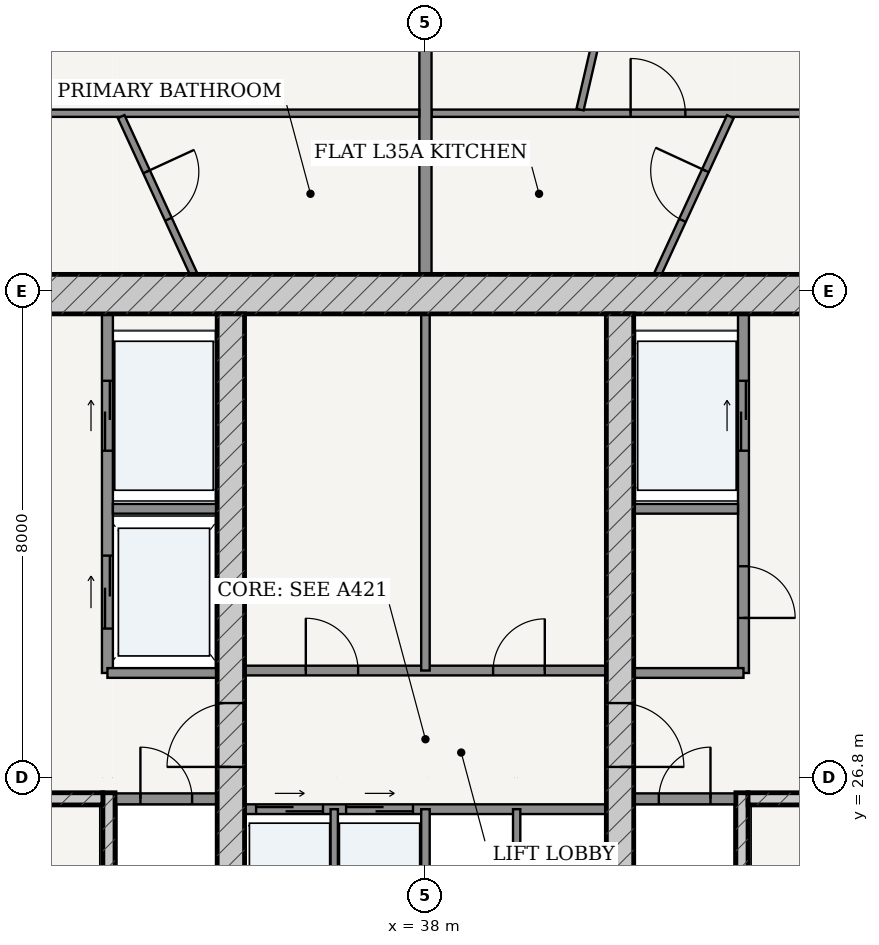
"""IFC4 building model, lengths in metres.
Left out: names, types, materials, properties, quantities, classifications, styles, units other than length and angle.
Written with IfcOpenShell. Run it as: python <this file> out.ifc"""

import sys

from ifc_helpers import new_model, si_unit, direction, frame, frame_2d, origin, place, context, subcontext, project, spatial, rectangle, extrude, source, transform, mapped, element, fill, save


model = new_model("IFC4")
c1 = context("Model", 3, precision=1e-05, world=origin(), true_north=direction((-0.2419218956, 0.970295726276)))
c2 = subcontext(c1, "Body", "Model", "MODEL_VIEW")
j1 = project(units=[si_unit("LENGTHUNIT", "METRE"), si_unit("PLANEANGLEUNIT", "RADIAN")], contexts=[c1])
p1 = place(None, origin())
s1 = spatial("IfcSite", under=j1, at=p1, CompositionType="ELEMENT")
p2 = place(p1, origin())
s2 = spatial("IfcBuilding", under=s1, at=p2, CompositionType="ELEMENT")
p3 = place(p2, frame((0.0, 0.0, 135.4)))
s3 = spatial("IfcBuildingStorey", under=s2, at=p3, CompositionType="ELEMENT", Elevation=135.4)
p4 = place(p3, frame((28.725, 34.75, 0.0), z_axis=(0.0, 0.0, 1.0), x_axis=(1.0, 0.0, 0.0)))
e1 = element("IfcWall", 1, at=p4, inside=s3, PredefinedType="SHEAR", context=c2, shape_type="SweptSolid", body=[
    extrude(rectangle(XDim=18.55, YDim=0.65, at=frame_2d((9.275, 0.0))), origin(), (0.0, 0.0, 1.0), 3.33),
])
p5 = place(p3, frame((32.795, 19.175, 0.0), z_axis=(0.0, 0.0, 1.0), x_axis=(0.0, 1.0, 0.0)))
e2 = element("IfcWall", 2, at=p5, inside=s3, PredefinedType="SOLIDWALL", context=c2, shape_type="SweptSolid", body=[
    extrude(rectangle(XDim=7.375, YDim=0.2, at=frame_2d((3.688, 0.0))), origin(), (0.0, 0.0, 1.0), 3.33),
])
p6 = place(p3, frame((29.375, 26.45, 0.0), z_axis=(0.0, 0.0, 1.0), x_axis=(1.0, 0.0, 0.0)))
e3 = element("IfcWall", 3, at=p6, inside=s3, PredefinedType="SOLIDWALL", context=c2, shape_type="SweptSolid", body=[
    extrude(rectangle(XDim=3.32, YDim=0.2, at=frame_2d((1.66, 0.0))), origin(), (0.0, 0.0, 1.0), 3.33),
])
p7 = place(p6, frame((1.185, 0.0, 0.0)))
e4 = element("IfcOpeningElement", 4, at=p7, cuts=e3, PredefinedType="OPENING", context=c2, shape_type="SweptSolid", body=[
    extrude(rectangle(XDim=0.95, YDim=2.15, at=frame_2d((0.475, 1.075))), frame((0.0, 0.11, 0.0), z_axis=(0.0, -1.0, 0.0), x_axis=(1.0, 0.0, 0.0)), (0.0, 0.0, 1.0), 0.22),
])
p8 = place(p3, frame((43.205, 19.175, 0.0), z_axis=(0.0, 0.0, 1.0), x_axis=(0.0, 1.0, 0.0)))
e5 = element("IfcWall", 5, at=p8, inside=s3, PredefinedType="SOLIDWALL", context=c2, shape_type="SweptSolid", body=[
    extrude(rectangle(XDim=7.375, YDim=0.2, at=frame_2d((3.688, 0.0))), origin(), (0.0, 0.0, 1.0), 3.33),
])
p9 = place(p3, frame((43.305, 26.45, 0.0), z_axis=(0.0, 0.0, 1.0), x_axis=(1.0, 0.0, 0.0)))
e6 = element("IfcWall", 6, at=p9, inside=s3, PredefinedType="SOLIDWALL", context=c2, shape_type="SweptSolid", body=[
    extrude(rectangle(XDim=3.32, YDim=0.2, at=frame_2d((1.66, 0.0))), origin(), (0.0, 0.0, 1.0), 3.33),
])
p10 = place(p9, frame((1.185, 0.0, 0.0)))
e7 = element("IfcOpeningElement", 7, at=p10, cuts=e6, PredefinedType="OPENING", context=c2, shape_type="SweptSolid", body=[
    extrude(rectangle(XDim=0.95, YDim=2.15, at=frame_2d((0.475, 1.075))), frame((0.0, 0.11, 0.0), z_axis=(0.0, -1.0, 0.0), x_axis=(1.0, 0.0, 0.0)), (0.0, 0.0, 1.0), 0.22),
])
p11 = place(p3, frame((34.8, 19.175, 0.0), z_axis=(0.0, 0.0, 1.0), x_axis=(0.0, 1.0, 0.0)))
e8 = element("IfcWall", 8, at=p11, inside=s3, PredefinedType="SHEAR", context=c2, shape_type="SweptSolid", body=[
    extrude(rectangle(XDim=15.25, YDim=0.45, at=frame_2d((7.625, 0.0))), origin(), (0.0, 0.0, 1.0), 3.33),
])
p12 = place(p11, frame((7.8, 0.0, 0.0)))
e9 = element("IfcOpeningElement", 9, at=p12, cuts=e8, PredefinedType="OPENING", context=c2, shape_type="SweptSolid", body=[
    extrude(rectangle(XDim=1.05, YDim=2.15, at=frame_2d((0.525, 1.075))), frame((0.0, 0.235, 0.0), z_axis=(0.0, -1.0, 0.0), x_axis=(1.0, 0.0, 0.0)), (0.0, 0.0, 1.0), 0.47),
])
p13 = place(p3, frame((41.2, 19.175, 0.0), z_axis=(0.0, 0.0, 1.0), x_axis=(0.0, 1.0, 0.0)))
e10 = element("IfcWall", 10, at=p13, inside=s3, PredefinedType="SHEAR", context=c2, shape_type="SweptSolid", body=[
    extrude(rectangle(XDim=15.25, YDim=0.45, at=frame_2d((7.625, 0.0))), origin(), (0.0, 0.0, 1.0), 3.33),
])
p14 = place(p13, frame((7.8, 0.0, 0.0)))
e11 = element("IfcOpeningElement", 11, at=p14, cuts=e10, PredefinedType="OPENING", context=c2, shape_type="SweptSolid", body=[
    extrude(rectangle(XDim=1.05, YDim=2.15, at=frame_2d((0.525, 1.075))), frame((0.0, 0.235, 0.0), z_axis=(0.0, -1.0, 0.0), x_axis=(1.0, 0.0, 0.0)), (0.0, 0.0, 1.0), 0.47),
])
p15 = place(p3, frame((32.9, 26.45, 0.0), z_axis=(0.0, 0.0, 1.0), x_axis=(1.0, 0.0, 0.0)))
e12 = element("IfcWall", 12, at=p15, inside=s3, PredefinedType="PARTITIONING", context=c2, shape_type="SweptSolid", body=[
    extrude(rectangle(XDim=1.675, YDim=0.18, at=frame_2d((0.837, 0.0))), origin(), (0.0, 0.0, 1.0), 3.33),
])
p16 = place(p15, frame((0.413, 0.0, 0.0)))
e13 = element("IfcOpeningElement", 13, at=p16, cuts=e12, PredefinedType="OPENING", context=c2, shape_type="SweptSolid", body=[
    extrude(rectangle(XDim=0.85, YDim=2.1, at=frame_2d((0.425, 1.05))), frame((0.0, 0.1, 0.0), z_axis=(0.0, -1.0, 0.0), x_axis=(1.0, 0.0, 0.0)), (0.0, 0.0, 1.0), 0.2),
])
p17 = place(p3, frame((41.425, 26.45, 0.0), z_axis=(0.0, 0.0, 1.0), x_axis=(1.0, 0.0, 0.0)))
e14 = element("IfcWall", 14, at=p17, inside=s3, PredefinedType="PARTITIONING", context=c2, shape_type="SweptSolid", body=[
    extrude(rectangle(XDim=1.675, YDim=0.18, at=frame_2d((0.837, 0.0))), origin(), (0.0, 0.0, 1.0), 3.33),
])
p18 = place(p17, frame((0.413, 0.0, 0.0)))
e15 = element("IfcOpeningElement", 15, at=p18, cuts=e14, PredefinedType="OPENING", context=c2, shape_type="SweptSolid", body=[
    extrude(rectangle(XDim=0.85, YDim=2.1, at=frame_2d((0.425, 1.05))), frame((0.0, 0.1, 0.0), z_axis=(0.0, -1.0, 0.0), x_axis=(1.0, 0.0, 0.0)), (0.0, 0.0, 1.0), 0.2),
])
p19 = place(p3, frame((32.77, 28.52, 0.0), z_axis=(0.0, 0.0, 1.0), x_axis=(0.0, 1.0, 0.0)))
e16 = element("IfcWall", 16, at=p19, inside=s3, PredefinedType="PARTITIONING", context=c2, shape_type="SweptSolid", body=[
    extrude(rectangle(XDim=5.905, YDim=0.18, at=frame_2d((2.953, 0.0))), origin(), (0.0, 0.0, 1.0), 3.33),
])
p20 = place(p19, frame((3.655, 0.0, 0.0)))
e17 = element("IfcOpeningElement", 17, at=p20, cuts=e16, PredefinedType="OPENING", context=c2, shape_type="SweptSolid", body=[
    extrude(rectangle(XDim=1.15, YDim=2.2, at=frame_2d((0.575, 1.1))), frame((0.0, 0.1, 0.0), z_axis=(0.0, -1.0, 0.0), x_axis=(1.0, 0.0, 0.0)), (0.0, 0.0, 1.0), 0.2),
])
p21 = place(p19, frame((0.73, 0.0, 0.0)))
e18 = element("IfcOpeningElement", 18, at=p21, cuts=e16, PredefinedType="OPENING", context=c2, shape_type="SweptSolid", body=[
    extrude(rectangle(XDim=1.2, YDim=2.25, at=frame_2d((0.6, 1.125))), frame((0.0, 0.1, 0.0), z_axis=(0.0, -1.0, 0.0), x_axis=(1.0, 0.0, 0.0)), (0.0, 0.0, 1.0), 0.2),
])
p22 = place(p3, frame((32.86, 31.22, 0.0), z_axis=(0.0, 0.0, 1.0), x_axis=(1.0, 0.0, 0.0)))
e19 = element("IfcWall", 19, at=p22, inside=s3, PredefinedType="PARTITIONING", context=c2, shape_type="SweptSolid", body=[
    extrude(rectangle(XDim=1.715, YDim=0.16, at=frame_2d((0.857, 0.0))), origin(), (0.0, 0.0, 1.0), 3.33),
])
p23 = place(p3, frame((32.77, 28.52, 0.0), z_axis=(0.0, 0.0, 1.0), x_axis=(1.0, 0.0, 0.0)))
e20 = element("IfcWall", 20, at=p23, inside=s3, PredefinedType="PARTITIONING", context=c2, shape_type="SweptSolid", body=[
    extrude(rectangle(XDim=1.805, YDim=0.16, at=frame_2d((0.902, 0.0))), origin(), (0.0, 0.0, 1.0), 3.33),
])
p24 = place(p3, frame((43.23, 28.52, 0.0), z_axis=(0.0, 0.0, 1.0), x_axis=(0.0, 1.0, 0.0)))
e21 = element("IfcWall", 21, at=p24, inside=s3, PredefinedType="PARTITIONING", context=c2, shape_type="SweptSolid", body=[
    extrude(rectangle(XDim=5.905, YDim=0.18, at=frame_2d((2.953, 0.0))), origin(), (0.0, 0.0, 1.0), 3.33),
])
p25 = place(p24, frame((0.905, 0.0, 0.0)))
e22 = element("IfcOpeningElement", 22, at=p25, cuts=e21, PredefinedType="OPENING", context=c2, shape_type="SweptSolid", body=[
    extrude(rectangle(XDim=0.85, YDim=2.1, at=frame_2d((0.425, 1.05))), frame((0.0, 0.1, 0.0), z_axis=(0.0, -1.0, 0.0), x_axis=(1.0, 0.0, 0.0)), (0.0, 0.0, 1.0), 0.2),
])
p26 = place(p24, frame((3.655, 0.0, 0.0)))
e23 = element("IfcOpeningElement", 23, at=p26, cuts=e21, PredefinedType="OPENING", context=c2, shape_type="SweptSolid", body=[
    extrude(rectangle(XDim=1.15, YDim=2.2, at=frame_2d((0.575, 1.1))), frame((0.0, 0.1, 0.0), z_axis=(0.0, -1.0, 0.0), x_axis=(1.0, 0.0, 0.0)), (0.0, 0.0, 1.0), 0.2),
])
p27 = place(p3, frame((41.425, 31.22, 0.0), z_axis=(0.0, 0.0, 1.0), x_axis=(1.0, 0.0, 0.0)))
e24 = element("IfcWall", 24, at=p27, inside=s3, PredefinedType="PARTITIONING", context=c2, shape_type="SweptSolid", body=[
    extrude(rectangle(XDim=1.715, YDim=0.16, at=frame_2d((0.857, 0.0))), origin(), (0.0, 0.0, 1.0), 3.33),
])
p28 = place(p3, frame((41.425, 28.52, 0.0), z_axis=(0.0, 0.0, 1.0), x_axis=(1.0, 0.0, 0.0)))
e25 = element("IfcWall", 25, at=p28, inside=s3, PredefinedType="PARTITIONING", context=c2, shape_type="SweptSolid", body=[
    extrude(rectangle(XDim=1.805, YDim=0.16, at=frame_2d((0.902, 0.0))), origin(), (0.0, 0.0, 1.0), 3.33),
])
p29 = place(p3, frame((35.025, 28.56, 0.0), z_axis=(0.0, 0.0, 1.0), x_axis=(1.0, 0.0, 0.0)))
e26 = element("IfcWall", 26, at=p29, inside=s3, PredefinedType="PARTITIONING", context=c2, shape_type="SweptSolid", body=[
    extrude(rectangle(XDim=5.95, YDim=0.16, at=frame_2d((2.975, 0.0))), origin(), (0.0, 0.0, 1.0), 3.33),
])
p30 = place(p29, frame((1.008, 0.0, 0.0)))
e27 = element("IfcOpeningElement", 27, at=p30, cuts=e26, PredefinedType="OPENING", context=c2, shape_type="SweptSolid", body=[
    extrude(rectangle(XDim=0.86, YDim=2.1, at=frame_2d((0.43, 1.05))), frame((0.0, 0.09, 0.0), z_axis=(0.0, -1.0, 0.0), x_axis=(1.0, 0.0, 0.0)), (0.0, 0.0, 1.0), 0.18),
])
p31 = place(p29, frame((4.087, 0.0, 0.0)))
e28 = element("IfcOpeningElement", 28, at=p31, cuts=e26, PredefinedType="OPENING", context=c2, shape_type="SweptSolid", body=[
    extrude(rectangle(XDim=0.85, YDim=2.1, at=frame_2d((0.425, 1.05))), frame((0.0, 0.09, 0.0), z_axis=(0.0, -1.0, 0.0), x_axis=(1.0, 0.0, 0.0)), (0.0, 0.0, 1.0), 0.18),
])
p32 = place(p3, frame((38.0, 28.56, 0.0), z_axis=(0.0, 0.0, 1.0), x_axis=(0.0, 1.0, 0.0)))
e29 = element("IfcWall", 29, at=p32, inside=s3, PredefinedType="PARTITIONING", context=c2, shape_type="SweptSolid", body=[
    extrude(rectangle(XDim=5.865, YDim=0.14, at=frame_2d((2.933, 0.0))), origin(), (0.0, 0.0, 1.0), 3.33),
])
p33 = place(p3, frame((35.025, 26.28, 0.0), z_axis=(0.0, 0.0, 1.0), x_axis=(1.0, 0.0, 0.0)))
e30 = element("IfcWall", 30, at=p33, inside=s3, PredefinedType="PARTITIONING", context=c2, shape_type="SweptSolid", body=[
    extrude(rectangle(XDim=5.95, YDim=0.16, at=frame_2d((2.975, 0.0))), origin(), (0.0, 0.0, 1.0), 3.33),
])
p34 = place(p33, frame((0.19, 0.0, 0.0)))
e31 = element("IfcOpeningElement", 31, at=p34, cuts=e30, PredefinedType="OPENING", context=c2, shape_type="SweptSolid", body=[
    extrude(rectangle(XDim=1.1, YDim=2.2, at=frame_2d((0.55, 1.1))), frame((0.0, 0.09, 0.0), z_axis=(0.0, -1.0, 0.0), x_axis=(1.0, 0.0, 0.0)), (0.0, 0.0, 1.0), 0.18),
])
p35 = place(p33, frame((1.67, 0.0, 0.0)))
e32 = element("IfcOpeningElement", 32, at=p35, cuts=e30, PredefinedType="OPENING", context=c2, shape_type="SweptSolid", body=[
    extrude(rectangle(XDim=1.1, YDim=2.2, at=frame_2d((0.55, 1.1))), frame((0.0, 0.09, 0.0), z_axis=(0.0, -1.0, 0.0), x_axis=(1.0, 0.0, 0.0)), (0.0, 0.0, 1.0), 0.18),
])
p36 = place(p3, frame((36.5, 23.72, 0.0), z_axis=(0.0, 0.0, 1.0), x_axis=(0.0, 1.0, 0.0)))
e33 = element("IfcWall", 33, at=p36, inside=s3, PredefinedType="PARTITIONING", context=c2, shape_type="SweptSolid", body=[
    extrude(rectangle(XDim=2.56, YDim=0.12, at=frame_2d((1.28, 0.0))), origin(), (0.0, 0.0, 1.0), 3.33),
])
p37 = place(p3, frame((38.0, 23.72, 0.0), z_axis=(0.0, 0.0, 1.0), x_axis=(0.0, 1.0, 0.0)))
e34 = element("IfcWall", 34, at=p37, inside=s3, PredefinedType="PARTITIONING", context=c2, shape_type="SweptSolid", body=[
    extrude(rectangle(XDim=2.56, YDim=0.14, at=frame_2d((1.28, 0.0))), origin(), (0.0, 0.0, 1.0), 3.33),
])
p38 = place(p3, frame((39.5, 23.72, 0.0), z_axis=(0.0, 0.0, 1.0), x_axis=(0.0, 1.0, 0.0)))
e35 = element("IfcWall", 35, at=p38, inside=s3, PredefinedType="PARTITIONING", context=c2, shape_type="SweptSolid", body=[
    extrude(rectangle(XDim=2.56, YDim=0.12, at=frame_2d((1.28, 0.0))), origin(), (0.0, 0.0, 1.0), 3.33),
])
p39 = place(p3, frame((38.102, 37.725, 0.0), z_axis=(0.0, 0.0, 1.0), x_axis=(1.0, 0.0, 0.0)))
e36 = element("IfcWall", 36, at=p39, inside=s3, PredefinedType="PARTITIONING", context=c2, shape_type="SweptSolid", body=[
    extrude(rectangle(XDim=6.363, YDim=0.12, at=frame_2d((3.182, 0.0))), origin(), (0.0, 0.0, 1.0), 2.776),
])
p40 = place(p39, frame((3.272, 0.0, 0.0)))
e37 = element("IfcOpeningElement", 37, at=p40, cuts=e36, PredefinedType="OPENING", context=c2, shape_type="SweptSolid", body=[
    extrude(rectangle(XDim=0.9, YDim=2.15, at=frame_2d((0.45, 1.075))), frame((0.0, 0.07, 0.0), z_axis=(0.0, -1.0, 0.0), x_axis=(1.0, 0.0, 0.0)), (0.0, 0.0, 1.0), 0.14),
])
p41 = place(p3, frame((40.542, 37.785, 0.0), z_axis=(0.0, 0.0, 1.0), x_axis=(0.225467545633, 0.974250679171, 0.0)))
e38 = element("IfcWall", 38, at=p41, inside=s3, PredefinedType="PARTITIONING", context=c2, shape_type="SweptSolid", body=[
    extrude(rectangle(XDim=9.559, YDim=0.12, at=frame_2d((4.78, 0.0))), origin(), (0.0, 0.0, 1.0), 2.776),
])
p42 = place(p41, frame((3.32, 0.0, 0.0)))
e39 = element("IfcOpeningElement", 39, at=p42, cuts=e38, PredefinedType="OPENING", context=c2, shape_type="SweptSolid", body=[
    extrude(rectangle(XDim=0.9, YDim=2.15, at=frame_2d((0.45, 1.075))), frame((0.0, 0.07, 0.0), z_axis=(0.0, -1.0, 0.0), x_axis=(1.0, 0.0, 0.0)), (0.0, 0.0, 1.0), 0.14),
])
p43 = place(p3, frame((41.817, 35.075, 0.0), z_axis=(0.0, 0.0, 1.0), x_axis=(0.418890148101, 0.908036917655, 0.0)))
e40 = element("IfcWall", 40, at=p43, inside=s3, PredefinedType="PARTITIONING", context=c2, shape_type="SweptSolid", body=[
    extrude(rectangle(XDim=2.856, YDim=0.12, at=frame_2d((1.428, 0.0))), origin(), (0.0, 0.0, 1.0), 3.33),
])
p44 = place(p43, frame((0.978, 0.0, 0.0)))
e41 = element("IfcOpeningElement", 41, at=p44, cuts=e40, PredefinedType="OPENING", context=c2, shape_type="SweptSolid", body=[
    extrude(rectangle(XDim=0.9, YDim=2.15, at=frame_2d((0.45, 1.075))), frame((0.0, 0.07, 0.0), z_axis=(0.0, -1.0, 0.0), x_axis=(1.0, 0.0, 0.0)), (0.0, 0.0, 1.0), 0.14),
])
p45 = place(p3, frame((38.0, 35.075, 0.0), z_axis=(0.0, 0.0, 1.0), x_axis=(0.0, 1.0, 0.0)))
e42 = element("IfcWall", 42, at=p45, inside=s3, PredefinedType="PARTITIONING", context=c2, shape_type="SweptSolid", body=[
    extrude(rectangle(XDim=12.465, YDim=0.2, at=frame_2d((6.232, 0.0))), origin(), (0.0, 0.0, 1.0), 2.415),
])
p46 = place(p3, frame((31.535, 37.725, 0.0), z_axis=(0.0, 0.0, 1.0), x_axis=(1.0, 0.0, 0.0)))
e43 = element("IfcWall", 43, at=p46, inside=s3, PredefinedType="PARTITIONING", context=c2, shape_type="SweptSolid", body=[
    extrude(rectangle(XDim=6.363, YDim=0.12, at=frame_2d((3.182, 0.0))), origin(), (0.0, 0.0, 1.0), 2.776),
])
p47 = place(p3, frame((34.19, 35.075, 0.0), z_axis=(0.0, 0.0, 1.0), x_axis=(-0.418255585009, 0.908329381672, 0.0)))
e44 = element("IfcWall", 44, at=p47, inside=s3, PredefinedType="PARTITIONING", context=c2, shape_type="SweptSolid", body=[
    extrude(rectangle(XDim=2.855, YDim=0.12, at=frame_2d((1.428, 0.0))), origin(), (0.0, 0.0, 1.0), 3.33),
])
p48 = place(p47, frame((0.998, 0.0, 0.0)))
e45 = element("IfcOpeningElement", 45, at=p48, cuts=e44, PredefinedType="OPENING", context=c2, shape_type="SweptSolid", body=[
    extrude(rectangle(XDim=0.86, YDim=2.15, at=frame_2d((0.43, 1.075))), frame((0.0, 0.07, 0.0), z_axis=(0.0, -1.0, 0.0), x_axis=(1.0, 0.0, 0.0)), (0.0, 0.0, 1.0), 0.14),
])
m1 = source(origin(), c2, "Body", "SweptSolid", [
    extrude(rectangle(XDim=1.05, YDim=2.15, at=frame_2d((0.525, 1.075))), frame((0.0, 0.025, 0.0), z_axis=(0.0, -1.0, 0.0), x_axis=(1.0, 0.0, 0.0)), (0.0, 0.0, 1.0), 0.05),
])
p49 = place(p12, origin())
e46 = element("IfcDoor", 46, at=p49, inside=s3, OperationType="SINGLE_SWING_LEFT", PredefinedType="DOOR", context=c2, shape_type="MappedRepresentation", body=[
    mapped(m1, transform((0.0, 0.0, 0.0), scale=1.0)),
])
fill(e9, e46)
p50 = place(p14, frame((1.05, 0.0, 0.0), z_axis=(0.0, 0.0, 1.0), x_axis=(-1.0, 0.0, 0.0)))
e47 = element("IfcDoor", 47, at=p50, inside=s3, OperationType="SINGLE_SWING_RIGHT", PredefinedType="DOOR", context=c2, shape_type="MappedRepresentation", body=[
    mapped(m1, transform((0.0, 0.0, 0.0), scale=1.0)),
])
fill(e11, e47)
m2 = source(origin(), c2, "Body", "SweptSolid", [
    extrude(rectangle(XDim=0.85, YDim=2.1, at=frame_2d((0.425, 1.05))), frame((0.0, 0.025, 0.0), z_axis=(0.0, -1.0, 0.0), x_axis=(1.0, 0.0, 0.0)), (0.0, 0.0, 1.0), 0.05),
])
p51 = place(p16, origin())
e48 = element("IfcDoor", 48, at=p51, inside=s3, OperationType="SINGLE_SWING_LEFT", PredefinedType="DOOR", context=c2, shape_type="MappedRepresentation", body=[
    mapped(m2, transform((0.0, 0.0, 0.0), scale=1.0)),
])
fill(e13, e48)
p52 = place(p18, origin())
e49 = element("IfcDoor", 49, at=p52, inside=s3, OperationType="SINGLE_SWING_RIGHT", PredefinedType="DOOR", context=c2, shape_type="MappedRepresentation", body=[
    mapped(m2, transform((0.0, 0.0, 0.0), scale=1.0)),
])
fill(e15, e49)
p53 = place(p25, frame((0.85, 0.0, 0.0), z_axis=(0.0, 0.0, 1.0), x_axis=(-1.0, 0.0, 0.0)))
e50 = element("IfcDoor", 50, at=p53, inside=s3, OperationType="SINGLE_SWING_RIGHT", PredefinedType="DOOR", context=c2, shape_type="MappedRepresentation", body=[
    mapped(m2, transform((0.0, 0.0, 0.0), scale=1.0)),
])
fill(e22, e50)
m3 = source(origin(), c2, "Body", "SweptSolid", [
    extrude(rectangle(XDim=0.86, YDim=2.1, at=frame_2d((0.43, 1.05))), frame((0.0, 0.025, 0.0), z_axis=(0.0, -1.0, 0.0), x_axis=(1.0, 0.0, 0.0)), (0.0, 0.0, 1.0), 0.05),
])
p54 = place(p30, origin())
e51 = element("IfcDoor", 51, at=p54, inside=s3, OperationType="SINGLE_SWING_LEFT", PredefinedType="DOOR", context=c2, shape_type="MappedRepresentation", body=[
    mapped(m3, transform((0.0, 0.0, 0.0), scale=1.0)),
])
fill(e27, e51)
p55 = place(p31, origin())
e52 = element("IfcDoor", 52, at=p55, inside=s3, OperationType="SINGLE_SWING_RIGHT", PredefinedType="DOOR", context=c2, shape_type="MappedRepresentation", body=[
    mapped(m2, transform((0.0, 0.0, 0.0), scale=1.0)),
])
fill(e28, e52)
m4 = source(origin(), c2, "Body", "SweptSolid", [
    extrude(rectangle(XDim=1.15, YDim=2.2, at=frame_2d((0.575, 1.1))), frame((0.0, 0.025, 0.0), z_axis=(0.0, -1.0, 0.0), x_axis=(1.0, 0.0, 0.0)), (0.0, 0.0, 1.0), 0.05),
])
p56 = place(p20, origin())
e53 = element("IfcDoor", 53, at=p56, inside=s3, OperationType="DOUBLE_DOOR_SLIDING", PredefinedType="DOOR", context=c2, shape_type="MappedRepresentation", body=[
    mapped(m4, transform((0.0, 0.0, 0.0), scale=1.0)),
])
fill(e17, e53)
p57 = place(p26, origin())
e54 = element("IfcDoor", 54, at=p57, inside=s3, OperationType="DOUBLE_DOOR_SLIDING", PredefinedType="DOOR", context=c2, shape_type="MappedRepresentation", body=[
    mapped(m4, transform((0.0, 0.0, 0.0), scale=1.0)),
])
fill(e23, e54)
m5 = source(origin(), c2, "Body", "SweptSolid", [
    extrude(rectangle(XDim=1.2, YDim=2.25, at=frame_2d((0.6, 1.125))), frame((0.0, 0.025, 0.0), z_axis=(0.0, -1.0, 0.0), x_axis=(1.0, 0.0, 0.0)), (0.0, 0.0, 1.0), 0.05),
])
p58 = place(p21, origin())
e55 = element("IfcDoor", 55, at=p58, inside=s3, OperationType="DOUBLE_DOOR_SLIDING", PredefinedType="DOOR", context=c2, shape_type="MappedRepresentation", body=[
    mapped(m5, transform((0.0, 0.0, 0.0), scale=1.0)),
])
fill(e18, e55)
m6 = source(origin(), c2, "Body", "SweptSolid", [
    extrude(rectangle(XDim=1.1, YDim=2.2, at=frame_2d((0.55, 1.1))), frame((0.0, 0.025, 0.0), z_axis=(0.0, -1.0, 0.0), x_axis=(1.0, 0.0, 0.0)), (0.0, 0.0, 1.0), 0.05),
])
p59 = place(p34, origin())
e56 = element("IfcDoor", 56, at=p59, inside=s3, OperationType="DOUBLE_DOOR_SLIDING", PredefinedType="DOOR", context=c2, shape_type="MappedRepresentation", body=[
    mapped(m6, transform((0.0, 0.0, 0.0), scale=1.0)),
])
fill(e31, e56)
p60 = place(p35, origin())
e57 = element("IfcDoor", 57, at=p60, inside=s3, OperationType="DOUBLE_DOOR_SLIDING", PredefinedType="DOOR", context=c2, shape_type="MappedRepresentation", body=[
    mapped(m6, transform((0.0, 0.0, 0.0), scale=1.0)),
])
fill(e32, e57)
m7 = source(origin(), c2, "Body", "SweptSolid", [
    extrude(rectangle(XDim=0.9, YDim=2.15, at=frame_2d((0.45, 1.075))), frame((0.0, 0.025, 0.0), z_axis=(0.0, -1.0, 0.0), x_axis=(1.0, 0.0, 0.0)), (0.0, 0.0, 1.0), 0.05),
])
p61 = place(p44, origin())
e58 = element("IfcDoor", 58, at=p61, inside=s3, OperationType="SINGLE_SWING_RIGHT", PredefinedType="DOOR", context=c2, shape_type="MappedRepresentation", body=[
    mapped(m7, transform((0.0, 0.0, 0.0), scale=1.0)),
])
fill(e41, e58)
p62 = place(p40, origin())
e59 = element("IfcDoor", 59, at=p62, inside=s3, OperationType="SINGLE_SWING_LEFT", PredefinedType="DOOR", context=c2, shape_type="MappedRepresentation", body=[
    mapped(m7, transform((0.0, 0.0, 0.0), scale=1.0)),
])
fill(e37, e59)
m8 = source(origin(), c2, "Body", "SweptSolid", [
    extrude(rectangle(XDim=0.86, YDim=2.15, at=frame_2d((0.43, 1.075))), frame((0.0, 0.025, 0.0), z_axis=(0.0, -1.0, 0.0), x_axis=(1.0, 0.0, 0.0)), (0.0, 0.0, 1.0), 0.05),
])
p63 = place(p48, frame((0.86, 0.0, 0.0), z_axis=(0.0, 0.0, 1.0), x_axis=(-1.0, 0.0, 0.0)))
e60 = element("IfcDoor", 60, at=p63, inside=s3, OperationType="SINGLE_SWING_LEFT", PredefinedType="DOOR", context=c2, shape_type="MappedRepresentation", body=[
    mapped(m8, transform((0.0, 0.0, 0.0), scale=1.0)),
])
fill(e45, e60)
save(model, sys.argv[1])
